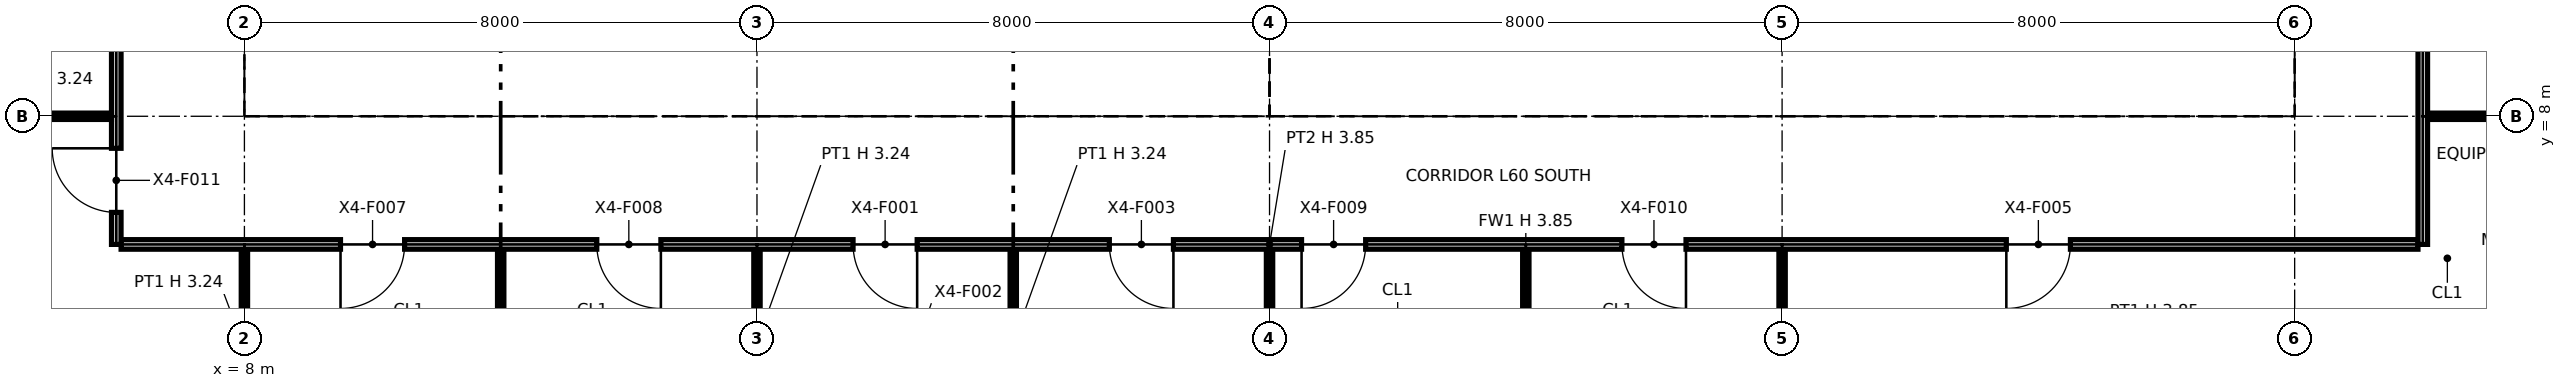
"""IFC4 building model, lengths in metres.
Left out: names, types, materials, properties, quantities, classifications, styles, units other than length and angle.
Written with IfcOpenShell. Run it as: python <this file> out.ifc"""

import sys

from ifc_helpers import new_model, si_unit, direction, frame, frame_2d, origin, origin_2d, place, context, subcontext, project, spatial, polyline, rectangle, i_section, outline, extrude, element, fill, save


model = new_model("IFC4")
c1 = context("Model", 3, precision=1e-05, world=origin(), true_north=direction((0.0, 1.0)))
c2 = subcontext(c1, "Body", "Model", "MODEL_VIEW")
j1 = project(units=[si_unit("LENGTHUNIT", "METRE"), si_unit("PLANEANGLEUNIT", "RADIAN")], contexts=[c1])
p1 = place(None, origin())
s1 = spatial("IfcSite", under=j1, at=p1, CompositionType="ELEMENT")
p2 = place(p1, origin())
s2 = spatial("IfcBuilding", under=s1, at=p2, CompositionType="ELEMENT")
p3 = place(p2, frame((0.0, 0.0, 275.0)))
s3 = spatial("IfcBuildingStorey", under=s2, at=p3, CompositionType="ELEMENT", Elevation=275.0)
for number, where, z_axis, x_axis in (
    (1, (8.0, 8.0, 0.0), (0.0, 0.0, 1.0), (1.0, 0.0, 0.0)),
    (2, (16.0, 8.0, 0.0), (0.0, 0.0, 1.0), (1.0, 0.0, 0.0)),
):
    element("IfcColumn", number, at=place(p3, frame(where, z_axis=z_axis, x_axis=x_axis)), inside=s3, PredefinedType="COLUMN", context=c2, shape_type="SweptSolid", body=[
        extrude(i_section(OverallWidth=0.257, OverallDepth=0.363, WebThickness=0.013, FlangeThickness=0.022, at=origin_2d()), origin(), (0.0, 0.0, 1.0), 3.85),
    ])
p4 = place(p3, frame((24.0, 8.0, 0.0), z_axis=(0.0, 0.0, 1.0), x_axis=(1.0, 0.0, 0.0)))
e3 = element("IfcColumn", 3, at=p4, inside=s3, PredefinedType="COLUMN", context=c2, shape_type="SweptSolid", body=[
    extrude(i_section(OverallWidth=0.371, OverallDepth=0.361, WebThickness=0.012, FlangeThickness=0.02, at=origin_2d()), origin(), (0.0, 0.0, 1.0), 3.85),
])
for number, where, z_axis, x_axis in (
    (4, (32.0, 8.0, 0.0), (0.0, 0.0, 1.0), (1.0, 0.0, 0.0)),
    (5, (40.0, 8.0, 0.0), (0.0, 0.0, 1.0), (1.0, 0.0, 0.0)),
):
    element("IfcColumn", number, at=place(p3, frame(where, z_axis=z_axis, x_axis=x_axis)), inside=s3, PredefinedType="COLUMN", context=c2, shape_type="SweptSolid", body=[
        extrude(i_section(OverallWidth=0.257, OverallDepth=0.363, WebThickness=0.013, FlangeThickness=0.022, at=origin_2d()), origin(), (0.0, 0.0, 1.0), 3.85),
    ])
p5 = place(p3, frame((8.65, 8.75, 0.0), z_axis=(0.0, 0.0, 1.0), x_axis=(1.0, 0.0, 0.0)))
e6 = element("IfcWall", 6, at=p5, inside=s3, PredefinedType="PARTITIONING", context=c2, shape_type="SweptSolid", body=[
    extrude(outline(polyline([(0.0, 0.0), (14.7, 0.0), (14.7, 3.85), (7.438, 3.85), (7.437, 3.318), (7.263, 3.318), (7.262, 3.85), (0.0, 3.85), (0.0, 0.0)])), frame((0.0, 0.1, 0.0), z_axis=(0.0, -1.0, 0.0), x_axis=(1.0, 0.0, 0.0)), (0.0, 0.0, 1.0), 0.2),
])
p6 = place(p5, frame((1.3, 0.0, 0.0)))
e7 = element("IfcOpeningElement", 7, at=p6, cuts=e6, PredefinedType="OPENING", context=c2, shape_type="SweptSolid", body=[
    extrude(rectangle(XDim=1.4, YDim=2.1, at=frame_2d((0.7, 1.05))), frame((0.0, 0.11, 0.0), z_axis=(0.0, -1.0, 0.0), x_axis=(1.0, 0.0, 0.0)), (0.0, 0.0, 1.0), 0.22),
])
p7 = place(p5, frame((4.6, 0.0, 0.0)))
e8 = element("IfcOpeningElement", 8, at=p7, cuts=e6, PredefinedType="OPENING", context=c2, shape_type="SweptSolid", body=[
    extrude(rectangle(XDim=1.4, YDim=2.1, at=frame_2d((0.7, 1.05))), frame((0.0, 0.11, 0.0), z_axis=(0.0, -1.0, 0.0), x_axis=(1.0, 0.0, 0.0)), (0.0, 0.0, 1.0), 0.22),
])
p8 = place(p5, frame((10.4, 0.0, 0.0)))
e9 = element("IfcOpeningElement", 9, at=p8, cuts=e6, PredefinedType="OPENING", context=c2, shape_type="SweptSolid", body=[
    extrude(rectangle(XDim=1.2, YDim=2.1, at=frame_2d((0.6, 1.05))), frame((0.0, 0.11, 0.0), z_axis=(0.0, -1.0, 0.0), x_axis=(1.0, 0.0, 0.0)), (0.0, 0.0, 1.0), 0.22),
])
p9 = place(p3, frame((8.75, 8.85, 0.0), z_axis=(0.0, 0.0, 1.0), x_axis=(0.0, 1.0, 0.0)))
e10 = element("IfcWall", 10, at=p9, inside=s3, PredefinedType="PARTITIONING", context=c2, shape_type="SweptSolid", body=[
    extrude(outline(polyline([(0.0, 0.0), (14.3, 0.0), (14.3, 3.85), (10.225, 3.85), (10.224, 3.44), (10.076, 3.44), (10.075, 3.85), (7.238, 3.85), (7.237, 3.318), (7.063, 3.318), (7.062, 3.85), (0.0, 3.85), (0.0, 0.0)])), frame((0.0, 0.1, 0.0), z_axis=(0.0, -1.0, 0.0), x_axis=(1.0, 0.0, 0.0)), (0.0, 0.0, 1.0), 0.2),
])
p10 = place(p9, frame((8.3, 0.0, 0.0)))
e11 = element("IfcOpeningElement", 11, at=p10, cuts=e10, PredefinedType="OPENING", context=c2, shape_type="SweptSolid", body=[
    extrude(rectangle(XDim=1.8, YDim=2.1, at=frame_2d((0.9, 1.05))), frame((0.0, 0.11, 0.0), z_axis=(0.0, -1.0, 0.0), x_axis=(1.0, 0.0, 0.0)), (0.0, 0.0, 1.0), 0.22),
])
p11 = place(p3, frame((12.4, 8.85, 0.0), z_axis=(0.0, 0.0, 1.0), x_axis=(0.0, 1.0, 0.0)))
e12 = element("IfcWall", 12, at=p11, inside=s3, PredefinedType="PARTITIONING", context=c2, shape_type="SweptSolid", body=[
    extrude(rectangle(XDim=6.85, YDim=0.2, at=frame_2d((3.425, 0.0))), origin(), (0.0, 0.0, 1.0), 3.85),
])
p12 = place(p3, frame((15.85, 8.85, 0.0), z_axis=(0.0, 0.0, 1.0), x_axis=(0.0, 1.0, 0.0)))
e13 = element("IfcWall", 13, at=p12, inside=s3, PredefinedType="PARTITIONING", context=c2, shape_type="SweptSolid", body=[
    extrude(rectangle(XDim=1.55, YDim=0.9, at=frame_2d((0.775, 0.0))), origin(), (0.0, 0.0, 1.0), 3.318),
])
p13 = place(p12, frame((0.3, 0.0, 0.0)))
e14 = element("IfcOpeningElement", 14, at=p13, cuts=e13, PredefinedType="OPENING", context=c2, shape_type="SweptSolid", body=[
    extrude(rectangle(XDim=1.1, YDim=2.1, at=frame_2d((0.55, 1.05))), frame((0.0, 0.46, 0.0), z_axis=(0.0, -1.0, 0.0), x_axis=(1.0, 0.0, 0.0)), (0.0, 0.0, 1.0), 0.92),
])
p14 = place(p3, frame((23.25, 8.85, 0.0), z_axis=(0.0, 0.0, 1.0), x_axis=(0.0, 1.0, 0.0)))
e15 = element("IfcWall", 15, at=p14, inside=s3, PredefinedType="PARTITIONING", context=c2, shape_type="SweptSolid", body=[
    extrude(outline(polyline([(0.0, 0.0), (14.3, 0.0), (14.3, 3.85), (10.225, 3.85), (10.224, 3.44), (10.076, 3.44), (10.075, 3.85), (7.238, 3.85), (7.237, 3.318), (7.063, 3.318), (7.062, 3.85), (5.225, 3.85), (5.224, 3.44), (5.076, 3.44), (5.075, 3.85), (0.0, 3.85), (0.0, 0.0)])), frame((0.0, 0.1, 0.0), z_axis=(0.0, -1.0, 0.0), x_axis=(1.0, 0.0, 0.0)), (0.0, 0.0, 1.0), 0.2),
])
p15 = place(p14, frame((8.3, 0.0, 0.0)))
e16 = element("IfcOpeningElement", 16, at=p15, cuts=e15, PredefinedType="OPENING", context=c2, shape_type="SweptSolid", body=[
    extrude(rectangle(XDim=1.8, YDim=2.1, at=frame_2d((0.9, 1.05))), frame((0.0, 0.11, 0.0), z_axis=(0.0, -1.0, 0.0), x_axis=(1.0, 0.0, 0.0)), (0.0, 0.0, 1.0), 0.22),
])
p16 = place(p3, frame((24.65, 8.75, 0.0), z_axis=(0.0, 0.0, 1.0), x_axis=(1.0, 0.0, 0.0)))
e17 = element("IfcWall", 17, at=p16, inside=s3, PredefinedType="PARTITIONING", context=c2, shape_type="SweptSolid", body=[
    extrude(outline(polyline([(0.0, 0.0), (14.7, 0.0), (14.7, 3.85), (7.438, 3.85), (7.437, 3.318), (7.263, 3.318), (7.262, 3.85), (0.0, 3.85), (0.0, 0.0)])), frame((0.0, 0.1, 0.0), z_axis=(0.0, -1.0, 0.0), x_axis=(1.0, 0.0, 0.0)), (0.0, 0.0, 1.0), 0.2),
])
p17 = place(p3, frame((24.75, 8.85, 0.0), z_axis=(0.0, 0.0, 1.0), x_axis=(0.0, 1.0, 0.0)))
e18 = element("IfcWall", 18, at=p17, inside=s3, PredefinedType="PARTITIONING", context=c2, shape_type="SweptSolid", body=[
    extrude(outline(polyline([(0.0, 0.0), (6.3, 0.0), (6.3, 3.85), (3.225, 3.85), (3.224, 3.44), (3.076, 3.44), (3.075, 3.85), (0.0, 3.85), (0.0, 0.0)])), frame((0.0, 0.1, 0.0), z_axis=(0.0, -1.0, 0.0), x_axis=(1.0, 0.0, 0.0)), (0.0, 0.0, 1.0), 0.2),
])
for number, where, z_axis, x_axis in (
    (19, (27.2, 8.85, 0.0), (0.0, 0.0, 1.0), (0.0, 1.0, 0.0)),
    (20, (29.5, 8.85, 0.0), (0.0, 0.0, 1.0), (0.0, 1.0, 0.0)),
):
    element("IfcWall", number, at=place(p3, frame(where, z_axis=z_axis, x_axis=x_axis)), inside=s3, PredefinedType="PARTITIONING", context=c2, shape_type="SweptSolid", body=[
        extrude(rectangle(XDim=2.55, YDim=0.2, at=frame_2d((1.275, 0.0))), origin(), (0.0, 0.0, 1.0), 3.85),
    ])
p18 = place(p3, frame((32.0, 8.85, 0.0), z_axis=(0.0, 0.0, 1.0), x_axis=(0.0, 1.0, 0.0)))
e21 = element("IfcWall", 21, at=p18, inside=s3, PredefinedType="PARTITIONING", context=c2, shape_type="SweptSolid", body=[
    extrude(rectangle(XDim=2.55, YDim=0.6, at=frame_2d((1.275, 0.0))), origin(), (0.0, 0.0, 1.0), 3.318),
])
for number, where, z_axis, x_axis in (
    (22, (35.6, 8.85, 0.0), (0.0, 0.0, 1.0), (0.0, 1.0, 0.0)),
    (23, (39.25, 8.85, 0.0), (0.0, 0.0, 1.0), (0.0, 1.0, 0.0)),
):
    element("IfcWall", number, at=place(p3, frame(where, z_axis=z_axis, x_axis=x_axis)), inside=s3, PredefinedType="PARTITIONING", context=c2, shape_type="SweptSolid", body=[
        extrude(rectangle(XDim=6.3, YDim=0.2, at=frame_2d((3.15, 0.0))), origin(), (0.0, 0.0, 1.0), 3.85),
    ])
for number, where, z_axis, x_axis in (
    (24, (8.0, 2.83, 0.0), (0.0, 0.0, 1.0), (0.0, 1.0, 0.0)),
    (25, (12.0, 2.83, 0.0), (0.0, 0.0, 1.0), (0.0, 1.0, 0.0)),
    (26, (24.0, 2.83, 0.0), (0.0, 0.0, 1.0), (0.0, 1.0, 0.0)),
    (27, (28.0, 2.83, 0.0), (0.0, 0.0, 1.0), (0.0, 1.0, 0.0)),
):
    element("IfcWall", number, at=place(p3, frame(where, z_axis=z_axis, x_axis=x_axis)), inside=s3, PredefinedType="PARTITIONING", context=c2, shape_type="SweptSolid", body=[
        extrude(rectangle(XDim=3.095, YDim=0.1, at=frame_2d((1.547, 0.0))), origin(), (0.0, 0.0, 1.0), 3.238),
    ])
for number, where, z_axis, x_axis in (
    (28, (16.0, 3.0, 0.0), (0.0, 0.0, 1.0), (0.0, 1.0, 0.0)),
    (29, (20.0, 3.0, 0.0), (0.0, 0.0, 1.0), (0.0, 1.0, 0.0)),
):
    element("IfcWall", number, at=place(p3, frame(where, z_axis=z_axis, x_axis=x_axis)), inside=s3, PredefinedType="PARTITIONING", context=c2, shape_type="SweptSolid", body=[
        extrude(rectangle(XDim=2.925, YDim=0.1, at=frame_2d((1.462, 0.0))), origin(), (0.0, 0.0, 1.0), 3.238),
    ])
p19 = place(p3, frame((32.0, 3.5, 0.0), z_axis=(0.0, 0.0, 1.0), x_axis=(0.0, 1.0, 0.0)))
e30 = element("IfcWall", 30, at=p19, inside=s3, PredefinedType="PARTITIONING", context=c2, shape_type="SweptSolid", body=[
    extrude(rectangle(XDim=2.425, YDim=0.1, at=frame_2d((1.212, 0.0))), origin(), (0.0, 0.0, 1.0), 3.238),
])
p20 = place(p3, frame((6.075, 6.0, 0.0), z_axis=(0.0, 0.0, 1.0), x_axis=(1.0, 0.0, 0.0)))
e31 = element("IfcWall", 31, at=p20, inside=s3, PredefinedType="PARTITIONING", context=c2, shape_type="SweptSolid", body=[
    extrude(rectangle(XDim=35.85, YDim=0.15, at=frame_2d((17.925, 0.0))), origin(), (0.0, 0.0, 1.0), 3.85),
])
p21 = place(p20, frame((12.425, 0.0, 0.0), z_axis=(0.0, 0.0, 1.0), x_axis=(-1.0, 0.0, 0.0)))
e32 = element("IfcOpeningElement", 32, at=p21, cuts=e31, PredefinedType="OPENING", context=c2, shape_type="SweptSolid", body=[
    extrude(rectangle(XDim=1.0, YDim=2.1, at=frame_2d((0.5, 1.05))), frame((0.0, 0.085, 0.0), z_axis=(0.0, -1.0, 0.0), x_axis=(1.0, 0.0, 0.0)), (0.0, 0.0, 1.0), 0.17),
])
p22 = place(p20, frame((16.425, 0.0, 0.0), z_axis=(0.0, 0.0, 1.0), x_axis=(-1.0, 0.0, 0.0)))
e33 = element("IfcOpeningElement", 33, at=p22, cuts=e31, PredefinedType="OPENING", context=c2, shape_type="SweptSolid", body=[
    extrude(rectangle(XDim=1.0, YDim=2.1, at=frame_2d((0.5, 1.05))), frame((0.0, 0.085, 0.0), z_axis=(0.0, -1.0, 0.0), x_axis=(1.0, 0.0, 0.0)), (0.0, 0.0, 1.0), 0.17),
])
p23 = place(p20, frame((30.425, 0.0, 0.0), z_axis=(0.0, 0.0, 1.0), x_axis=(-1.0, 0.0, 0.0)))
e34 = element("IfcOpeningElement", 34, at=p23, cuts=e31, PredefinedType="OPENING", context=c2, shape_type="SweptSolid", body=[
    extrude(rectangle(XDim=1.0, YDim=2.1, at=frame_2d((0.5, 1.05))), frame((0.0, 0.085, 0.0), z_axis=(0.0, -1.0, 0.0), x_axis=(1.0, 0.0, 0.0)), (0.0, 0.0, 1.0), 0.17),
])
p24 = place(p20, frame((4.425, 0.0, 0.0), z_axis=(0.0, 0.0, 1.0), x_axis=(-1.0, 0.0, 0.0)))
e35 = element("IfcOpeningElement", 35, at=p24, cuts=e31, PredefinedType="OPENING", context=c2, shape_type="SweptSolid", body=[
    extrude(rectangle(XDim=1.0, YDim=2.1, at=frame_2d((0.5, 1.05))), frame((0.0, 0.085, 0.0), z_axis=(0.0, -1.0, 0.0), x_axis=(1.0, 0.0, 0.0)), (0.0, 0.0, 1.0), 0.17),
])
p25 = place(p20, frame((8.425, 0.0, 0.0), z_axis=(0.0, 0.0, 1.0), x_axis=(-1.0, 0.0, 0.0)))
e36 = element("IfcOpeningElement", 36, at=p25, cuts=e31, PredefinedType="OPENING", context=c2, shape_type="SweptSolid", body=[
    extrude(rectangle(XDim=1.0, YDim=2.1, at=frame_2d((0.5, 1.05))), frame((0.0, 0.085, 0.0), z_axis=(0.0, -1.0, 0.0), x_axis=(1.0, 0.0, 0.0)), (0.0, 0.0, 1.0), 0.17),
])
p26 = place(p20, frame((19.425, 0.0, 0.0), z_axis=(0.0, 0.0, 1.0), x_axis=(-1.0, 0.0, 0.0)))
e37 = element("IfcOpeningElement", 37, at=p26, cuts=e31, PredefinedType="OPENING", context=c2, shape_type="SweptSolid", body=[
    extrude(rectangle(XDim=1.0, YDim=2.1, at=frame_2d((0.5, 1.05))), frame((0.0, 0.085, 0.0), z_axis=(0.0, -1.0, 0.0), x_axis=(1.0, 0.0, 0.0)), (0.0, 0.0, 1.0), 0.17),
])
p27 = place(p20, frame((24.425, 0.0, 0.0), z_axis=(0.0, 0.0, 1.0), x_axis=(-1.0, 0.0, 0.0)))
e38 = element("IfcOpeningElement", 38, at=p27, cuts=e31, PredefinedType="OPENING", context=c2, shape_type="SweptSolid", body=[
    extrude(rectangle(XDim=1.0, YDim=2.1, at=frame_2d((0.5, 1.05))), frame((0.0, 0.085, 0.0), z_axis=(0.0, -1.0, 0.0), x_axis=(1.0, 0.0, 0.0)), (0.0, 0.0, 1.0), 0.17),
])
p28 = place(p3, frame((6.0, 6.0, 0.0), z_axis=(0.0, 0.0, 1.0), x_axis=(0.0, 1.0, 0.0)))
e39 = element("IfcWall", 39, at=p28, inside=s3, PredefinedType="PARTITIONING", context=c2, shape_type="SweptSolid", body=[
    extrude(outline(polyline([(0.0, 0.0), (13.375, 0.0), (13.375, 3.85), (10.3, 3.85), (10.298, 3.238), (9.702, 3.238), (9.7, 3.85), (6.3, 3.85), (6.298, 3.238), (5.702, 3.238), (5.7, 3.85), (2.3, 3.85), (2.298, 3.238), (1.702, 3.238), (1.7, 3.85), (0.0, 3.85), (0.0, 0.0)])), frame((0.0, 0.075, 0.0), z_axis=(0.0, -1.0, 0.0), x_axis=(1.0, 0.0, 0.0)), (0.0, 0.0, 1.0), 0.15),
])
p29 = place(p28, frame((0.5, 0.0, 0.0)))
e40 = element("IfcOpeningElement", 40, at=p29, cuts=e39, PredefinedType="OPENING", context=c2, shape_type="SweptSolid", body=[
    extrude(rectangle(XDim=1.0, YDim=2.1, at=frame_2d((0.5, 1.05))), frame((0.0, 0.085, 0.0), z_axis=(0.0, -1.0, 0.0), x_axis=(1.0, 0.0, 0.0)), (0.0, 0.0, 1.0), 0.17),
])
p30 = place(p28, frame((3.5, 0.0, 0.0)))
e41 = element("IfcOpeningElement", 41, at=p30, cuts=e39, PredefinedType="OPENING", context=c2, shape_type="SweptSolid", body=[
    extrude(rectangle(XDim=1.0, YDim=2.1, at=frame_2d((0.5, 1.05))), frame((0.0, 0.085, 0.0), z_axis=(0.0, -1.0, 0.0), x_axis=(1.0, 0.0, 0.0)), (0.0, 0.0, 1.0), 0.17),
])
p31 = place(p28, frame((7.5, 0.0, 0.0)))
e42 = element("IfcOpeningElement", 42, at=p31, cuts=e39, PredefinedType="OPENING", context=c2, shape_type="SweptSolid", body=[
    extrude(rectangle(XDim=1.0, YDim=2.1, at=frame_2d((0.5, 1.05))), frame((0.0, 0.085, 0.0), z_axis=(0.0, -1.0, 0.0), x_axis=(1.0, 0.0, 0.0)), (0.0, 0.0, 1.0), 0.17),
])
p32 = place(p28, frame((11.225, 0.0, 0.0)))
e43 = element("IfcOpeningElement", 43, at=p32, cuts=e39, PredefinedType="OPENING", context=c2, shape_type="SweptSolid", body=[
    extrude(rectangle(XDim=1.0, YDim=2.1, at=frame_2d((0.5, 1.05))), frame((0.0, 0.085, 0.0), z_axis=(0.0, -1.0, 0.0), x_axis=(1.0, 0.0, 0.0)), (0.0, 0.0, 1.0), 0.17),
])
p33 = place(p3, frame((42.0, 6.0, 0.0), z_axis=(0.0, 0.0, 1.0), x_axis=(0.0, 1.0, 0.0)))
e44 = element("IfcWall", 44, at=p33, inside=s3, PredefinedType="PARTITIONING", context=c2, shape_type="SweptSolid", body=[
    extrude(outline(polyline([(0.0, 0.0), (11.925, 0.0), (11.925, 3.85), (10.3, 3.85), (10.298, 3.238), (9.702, 3.238), (9.7, 3.85), (6.3, 3.85), (6.298, 3.238), (5.702, 3.238), (5.7, 3.85), (2.3, 3.85), (2.298, 3.238), (1.702, 3.238), (1.7, 3.85), (0.0, 3.85), (0.0, 0.0)])), frame((0.0, 0.075, 0.0), z_axis=(0.0, -1.0, 0.0), x_axis=(1.0, 0.0, 0.0)), (0.0, 0.0, 1.0), 0.15),
])
p34 = place(p33, frame((4.5, 0.0, 0.0), z_axis=(0.0, 0.0, 1.0), x_axis=(-1.0, 0.0, 0.0)))
e45 = element("IfcOpeningElement", 45, at=p34, cuts=e44, PredefinedType="OPENING", context=c2, shape_type="SweptSolid", body=[
    extrude(rectangle(XDim=1.0, YDim=2.1, at=frame_2d((0.5, 1.05))), frame((0.0, 0.085, 0.0), z_axis=(0.0, -1.0, 0.0), x_axis=(1.0, 0.0, 0.0)), (0.0, 0.0, 1.0), 0.17),
])
p35 = place(p33, frame((8.5, 0.0, 0.0), z_axis=(0.0, 0.0, 1.0), x_axis=(-1.0, 0.0, 0.0)))
e46 = element("IfcOpeningElement", 46, at=p35, cuts=e44, PredefinedType="OPENING", context=c2, shape_type="SweptSolid", body=[
    extrude(rectangle(XDim=1.0, YDim=2.1, at=frame_2d((0.5, 1.05))), frame((0.0, 0.085, 0.0), z_axis=(0.0, -1.0, 0.0), x_axis=(1.0, 0.0, 0.0)), (0.0, 0.0, 1.0), 0.17),
])
p36 = place(p33, frame((11.5, 0.0, 0.0), z_axis=(0.0, 0.0, 1.0), x_axis=(-1.0, 0.0, 0.0)))
e47 = element("IfcOpeningElement", 47, at=p36, cuts=e44, PredefinedType="OPENING", context=c2, shape_type="SweptSolid", body=[
    extrude(rectangle(XDim=1.0, YDim=2.1, at=frame_2d((0.5, 1.05))), frame((0.0, 0.085, 0.0), z_axis=(0.0, -1.0, 0.0), x_axis=(1.0, 0.0, 0.0)), (0.0, 0.0, 1.0), 0.17),
])
for number, where, z_axis, x_axis in (
    (48, (2.83, 8.0, 0.0), (0.0, 0.0, 1.0), (1.0, 0.0, 0.0)),
    (49, (42.075, 8.0, 0.0), (0.0, 0.0, 1.0), (1.0, 0.0, 0.0)),
):
    element("IfcWall", number, at=place(p3, frame(where, z_axis=z_axis, x_axis=x_axis)), inside=s3, PredefinedType="PARTITIONING", context=c2, shape_type="SweptSolid", body=[
        extrude(rectangle(XDim=3.095, YDim=0.1, at=frame_2d((1.547, 0.0))), origin(), (0.0, 0.0, 1.0), 3.238),
    ])
p37 = place(p6, origin())
e50 = element("IfcDoor", 50, at=p37, inside=s3, OperationType="DOUBLE_DOOR_SINGLE_SWING", PredefinedType="NOTDEFINED", context=c2, shape_type="SweptSolid", body=[
    extrude(rectangle(XDim=1.4, YDim=2.1, at=frame_2d((0.7, 1.05))), frame((0.0, 0.025, 0.0), z_axis=(0.0, -1.0, 0.0), x_axis=(1.0, 0.0, 0.0)), (0.0, 0.0, 1.0), 0.05),
])
fill(e7, e50)
p38 = place(p7, origin())
e51 = element("IfcDoor", 51, at=p38, inside=s3, OperationType="DOUBLE_DOOR_SINGLE_SWING", PredefinedType="NOTDEFINED", context=c2, shape_type="SweptSolid", body=[
    extrude(rectangle(XDim=1.4, YDim=2.1, at=frame_2d((0.7, 1.05))), frame((0.0, 0.025, 0.0), z_axis=(0.0, -1.0, 0.0), x_axis=(1.0, 0.0, 0.0)), (0.0, 0.0, 1.0), 0.05),
])
fill(e8, e51)
p39 = place(p8, origin())
e52 = element("IfcDoor", 52, at=p39, inside=s3, OperationType="SINGLE_SWING_LEFT", PredefinedType="NOTDEFINED", context=c2, shape_type="SweptSolid", body=[
    extrude(rectangle(XDim=1.2, YDim=2.1, at=frame_2d((0.6, 1.05))), frame((0.0, 0.025, 0.0), z_axis=(0.0, -1.0, 0.0), x_axis=(1.0, 0.0, 0.0)), (0.0, 0.0, 1.0), 0.05),
])
fill(e9, e52)
p40 = place(p21, origin())
e53 = element("IfcDoor", 53, at=p40, inside=s3, OperationType="SINGLE_SWING_LEFT", PredefinedType="DOOR", context=c2, shape_type="SweptSolid", body=[
    extrude(rectangle(XDim=1.0, YDim=2.1, at=frame_2d((0.5, 1.05))), frame((0.0, 0.025, 0.0), z_axis=(0.0, -1.0, 0.0), x_axis=(1.0, 0.0, 0.0)), (0.0, 0.0, 1.0), 0.05),
])
fill(e32, e53)
p41 = place(p22, origin())
e54 = element("IfcDoor", 54, at=p41, inside=s3, OperationType="SINGLE_SWING_LEFT", PredefinedType="DOOR", context=c2, shape_type="SweptSolid", body=[
    extrude(rectangle(XDim=1.0, YDim=2.1, at=frame_2d((0.5, 1.05))), frame((0.0, 0.025, 0.0), z_axis=(0.0, -1.0, 0.0), x_axis=(1.0, 0.0, 0.0)), (0.0, 0.0, 1.0), 0.05),
])
fill(e33, e54)
p42 = place(p23, origin())
e55 = element("IfcDoor", 55, at=p42, inside=s3, OperationType="SINGLE_SWING_RIGHT", PredefinedType="DOOR", context=c2, shape_type="SweptSolid", body=[
    extrude(rectangle(XDim=1.0, YDim=2.1, at=frame_2d((0.5, 1.05))), frame((0.0, 0.025, 0.0), z_axis=(0.0, -1.0, 0.0), x_axis=(1.0, 0.0, 0.0)), (0.0, 0.0, 1.0), 0.05),
])
fill(e34, e55)
p43 = place(p24, origin())
e56 = element("IfcDoor", 56, at=p43, inside=s3, OperationType="SINGLE_SWING_RIGHT", PredefinedType="DOOR", context=c2, shape_type="SweptSolid", body=[
    extrude(rectangle(XDim=1.0, YDim=2.1, at=frame_2d((0.5, 1.05))), frame((0.0, 0.025, 0.0), z_axis=(0.0, -1.0, 0.0), x_axis=(1.0, 0.0, 0.0)), (0.0, 0.0, 1.0), 0.05),
])
fill(e35, e56)
p44 = place(p25, origin())
e57 = element("IfcDoor", 57, at=p44, inside=s3, OperationType="SINGLE_SWING_LEFT", PredefinedType="DOOR", context=c2, shape_type="SweptSolid", body=[
    extrude(rectangle(XDim=1.0, YDim=2.1, at=frame_2d((0.5, 1.05))), frame((0.0, 0.025, 0.0), z_axis=(0.0, -1.0, 0.0), x_axis=(1.0, 0.0, 0.0)), (0.0, 0.0, 1.0), 0.05),
])
fill(e36, e57)
p45 = place(p26, origin())
e58 = element("IfcDoor", 58, at=p45, inside=s3, OperationType="SINGLE_SWING_RIGHT", PredefinedType="DOOR", context=c2, shape_type="SweptSolid", body=[
    extrude(rectangle(XDim=1.0, YDim=2.1, at=frame_2d((0.5, 1.05))), frame((0.0, 0.025, 0.0), z_axis=(0.0, -1.0, 0.0), x_axis=(1.0, 0.0, 0.0)), (0.0, 0.0, 1.0), 0.05),
])
fill(e37, e58)
p46 = place(p27, origin())
e59 = element("IfcDoor", 59, at=p46, inside=s3, OperationType="SINGLE_SWING_LEFT", PredefinedType="DOOR", context=c2, shape_type="SweptSolid", body=[
    extrude(rectangle(XDim=1.0, YDim=2.1, at=frame_2d((0.5, 1.05))), frame((0.0, 0.025, 0.0), z_axis=(0.0, -1.0, 0.0), x_axis=(1.0, 0.0, 0.0)), (0.0, 0.0, 1.0), 0.05),
])
fill(e38, e59)
p47 = place(p29, origin())
e60 = element("IfcDoor", 60, at=p47, inside=s3, OperationType="SINGLE_SWING_RIGHT", PredefinedType="DOOR", context=c2, shape_type="SweptSolid", body=[
    extrude(rectangle(XDim=1.0, YDim=2.1, at=frame_2d((0.5, 1.05))), frame((0.0, 0.025, 0.0), z_axis=(0.0, -1.0, 0.0), x_axis=(1.0, 0.0, 0.0)), (0.0, 0.0, 1.0), 0.05),
])
fill(e40, e60)
save(model, sys.argv[1])
